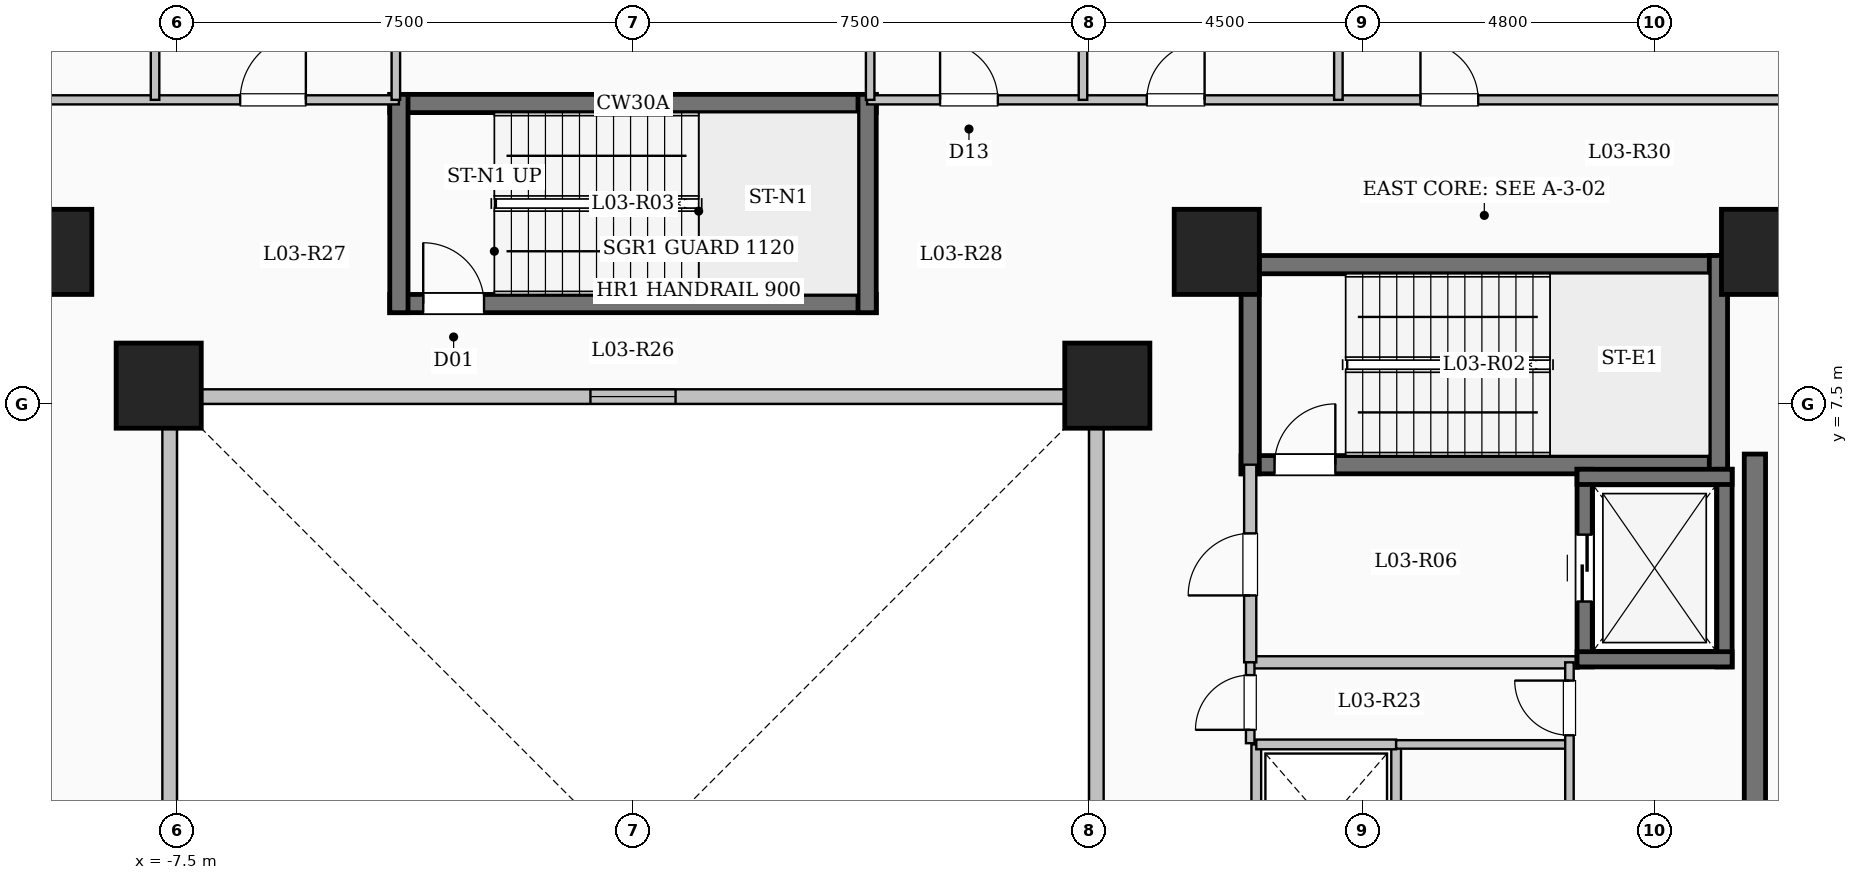
"""IFC4 building model, lengths in metres.
Left out: names, types, materials, properties, quantities, classifications, styles, units other than length and angle.
Written with IfcOpenShell. Run it as: python <this file> out.ifc"""

import sys

from ifc_helpers import new_model, si_unit, direction, frame, frame_2d, origin, origin_2d, place, context, subcontext, project, spatial, rectangle, extrude, element, fill, save


model = new_model("IFC4")
c1 = context("Model", 3, precision=1e-05, world=origin(), true_north=direction((0.0, 1.0)))
c2 = subcontext(c1, "Body", "Model", "MODEL_VIEW")
j1 = project(units=[si_unit("LENGTHUNIT", "METRE"), si_unit("PLANEANGLEUNIT", "RADIAN")], contexts=[c1])
p1 = place(None, origin())
s1 = spatial("IfcSite", under=j1, at=p1, CompositionType="ELEMENT")
p2 = place(p1, origin())
s2 = spatial("IfcBuilding", under=s1, at=p2, CompositionType="ELEMENT")
p3 = place(p2, frame((0.0, 0.0, 14.4)))
s3 = spatial("IfcBuildingStorey", under=s2, at=p3, CompositionType="ELEMENT", Elevation=14.4)
for number, where, z_axis, x_axis in (
    (1, (-7.8, 7.8, 0.0), (0.0, 0.0, 1.0), (1.0, 0.0, 0.0)),
    (2, (7.8, 7.8, 0.0), (0.0, 0.0, 1.0), (1.0, 0.0, 0.0)),
    (3, (-9.6, 10.0, 0.0), (0.0, 0.0, 1.0), (1.0, 0.0, 0.0)),
    (4, (9.6, 10.0, 0.0), (0.0, 0.0, 1.0), (1.0, 0.0, 0.0)),
    (5, (18.6, 10.0, 0.0), (0.0, 0.0, 1.0), (1.0, 0.0, 0.0)),
):
    element("IfcColumn", number, at=place(p3, frame(where, z_axis=z_axis, x_axis=x_axis)), inside=s3, PredefinedType="COLUMN", context=c2, shape_type="SweptSolid", body=[
        extrude(rectangle(XDim=1.4, YDim=1.4, at=origin_2d()), origin(), (0.0, 0.0, 1.0), 4.5),
    ])
p4 = place(p3, frame((7.62, -7.62, 0.0), z_axis=(0.0, 0.0, 1.0), x_axis=(0.0, 1.0, 0.0)))
e6 = element("IfcWall", 6, at=p4, inside=s3, PredefinedType="SOLIDWALL", context=c2, shape_type="SweptSolid", body=[
    extrude(rectangle(XDim=15.24, YDim=0.24, at=frame_2d((7.62, 0.0))), origin(), (0.0, 0.0, 1.0), 4.2),
])
p5 = place(p4, frame((6.92, 0.0, 0.95)))
e7 = element("IfcOpeningElement", 7, at=p5, cuts=e6, PredefinedType="OPENING", context=c2, shape_type="SweptSolid", body=[
    extrude(rectangle(XDim=1.4, YDim=1.5, at=frame_2d((0.7, 0.75))), frame((0.0, 0.13, 0.0), z_axis=(0.0, -1.0, 0.0), x_axis=(1.0, 0.0, 0.0)), (0.0, 0.0, 1.0), 0.26),
])
p6 = place(p3, frame((7.62, 7.62, 0.0), z_axis=(0.0, 0.0, 1.0), x_axis=(-1.0, 0.0, 0.0)))
e8 = element("IfcWall", 8, at=p6, inside=s3, PredefinedType="SOLIDWALL", context=c2, shape_type="SweptSolid", body=[
    extrude(rectangle(XDim=15.24, YDim=0.24, at=frame_2d((7.62, 0.0))), origin(), (0.0, 0.0, 1.0), 4.2),
])
p7 = place(p6, frame((6.92, 0.0, 0.95)))
e9 = element("IfcOpeningElement", 9, at=p7, cuts=e8, PredefinedType="OPENING", context=c2, shape_type="SweptSolid", body=[
    extrude(rectangle(XDim=1.4, YDim=1.5, at=frame_2d((0.7, 0.75))), frame((0.0, 0.13, 0.0), z_axis=(0.0, -1.0, 0.0), x_axis=(1.0, 0.0, 0.0)), (0.0, 0.0, 1.0), 0.26),
])
p8 = place(p3, frame((-7.62, 7.62, 0.0), z_axis=(0.0, 0.0, 1.0), x_axis=(0.0, -1.0, 0.0)))
e10 = element("IfcWall", 10, at=p8, inside=s3, PredefinedType="SOLIDWALL", context=c2, shape_type="SweptSolid", body=[
    extrude(rectangle(XDim=15.24, YDim=0.24, at=frame_2d((7.62, 0.0))), origin(), (0.0, 0.0, 1.0), 4.2),
])
p9 = place(p8, frame((6.92, 0.0, 0.95)))
e11 = element("IfcOpeningElement", 11, at=p9, cuts=e10, PredefinedType="OPENING", context=c2, shape_type="SweptSolid", body=[
    extrude(rectangle(XDim=1.4, YDim=1.5, at=frame_2d((0.7, 0.75))), frame((0.0, 0.13, 0.0), z_axis=(0.0, -1.0, 0.0), x_axis=(1.0, 0.0, 0.0)), (0.0, 0.0, 1.0), 0.26),
])
p10 = place(p3, frame((10.0, 9.79, 0.0), z_axis=(0.0, 0.0, 1.0), x_axis=(1.0, 0.0, 0.0)))
e12 = element("IfcWall", 12, at=p10, inside=s3, PredefinedType="SHEAR", context=c2, shape_type="SweptSolid", body=[
    extrude(rectangle(XDim=8.0, YDim=0.3, at=frame_2d((4.0, 0.0))), origin(), (0.0, 0.0, 1.0), 4.5),
])
p11 = place(p3, frame((10.0, 6.5, 0.0), z_axis=(0.0, 0.0, 1.0), x_axis=(1.0, 0.0, 0.0)))
e13 = element("IfcWall", 13, at=p11, inside=s3, PredefinedType="SHEAR", context=c2, shape_type="SweptSolid", body=[
    extrude(rectangle(XDim=8.0, YDim=0.3, at=frame_2d((4.0, 0.0))), origin(), (0.0, 0.0, 1.0), 4.5),
])
p12 = place(p11, frame((0.55, 0.0, 0.0)))
e14 = element("IfcOpeningElement", 14, at=p12, cuts=e13, PredefinedType="OPENING", context=c2, shape_type="SweptSolid", body=[
    extrude(rectangle(XDim=1.0, YDim=2.15, at=frame_2d((0.5, 1.075))), frame((0.0, 0.16, 0.0), z_axis=(0.0, -1.0, 0.0), x_axis=(1.0, 0.0, 0.0)), (0.0, 0.0, 1.0), 0.32),
])
for number, where, z_axis, x_axis in (
    (15, (10.15, 6.35, 0.0), (0.0, 0.0, 1.0), (0.0, 1.0, 0.0)),
    (16, (17.85, 6.35, 0.0), (0.0, 0.0, 1.0), (0.0, 1.0, 0.0)),
):
    element("IfcWall", number, at=place(p3, frame(where, z_axis=z_axis, x_axis=x_axis)), inside=s3, PredefinedType="SHEAR", context=c2, shape_type="SweptSolid", body=[
        extrude(rectangle(XDim=3.59, YDim=0.3, at=frame_2d((1.795, 0.0))), origin(), (0.0, 0.0, 1.0), 4.5),
    ])
p13 = place(p3, frame((-4.0, 12.44, 0.0), z_axis=(0.0, 0.0, 1.0), x_axis=(1.0, 0.0, 0.0)))
e17 = element("IfcWall", 17, at=p13, inside=s3, PredefinedType="SHEAR", context=c2, shape_type="SweptSolid", body=[
    extrude(rectangle(XDim=8.0, YDim=0.3, at=frame_2d((4.0, 0.0))), origin(), (0.0, 0.0, 1.0), 4.5),
])
p14 = place(p3, frame((-4.0, 9.15, 0.0), z_axis=(0.0, 0.0, 1.0), x_axis=(1.0, 0.0, 0.0)))
e18 = element("IfcWall", 18, at=p14, inside=s3, PredefinedType="SHEAR", context=c2, shape_type="SweptSolid", body=[
    extrude(rectangle(XDim=8.0, YDim=0.3, at=frame_2d((4.0, 0.0))), origin(), (0.0, 0.0, 1.0), 4.5),
])
p15 = place(p14, frame((0.55, 0.0, 0.0)))
e19 = element("IfcOpeningElement", 19, at=p15, cuts=e18, PredefinedType="OPENING", context=c2, shape_type="SweptSolid", body=[
    extrude(rectangle(XDim=1.0, YDim=2.15, at=frame_2d((0.5, 1.075))), frame((0.0, 0.16, 0.0), z_axis=(0.0, -1.0, 0.0), x_axis=(1.0, 0.0, 0.0)), (0.0, 0.0, 1.0), 0.32),
])
for number, where, z_axis, x_axis in (
    (20, (-3.85, 9.0, 0.0), (0.0, 0.0, 1.0), (0.0, 1.0, 0.0)),
    (21, (3.85, 9.0, 0.0), (0.0, 0.0, 1.0), (0.0, 1.0, 0.0)),
):
    element("IfcWall", number, at=place(p3, frame(where, z_axis=z_axis, x_axis=x_axis)), inside=s3, PredefinedType="SHEAR", context=c2, shape_type="SweptSolid", body=[
        extrude(rectangle(XDim=3.59, YDim=0.3, at=frame_2d((1.795, 0.0))), origin(), (0.0, 0.0, 1.0), 4.5),
    ])
p16 = place(p3, frame((10.15, 3.25, 0.0), z_axis=(0.0, 0.0, 1.0), x_axis=(1.0, 0.0, 0.0)))
e22 = element("IfcWall", 22, at=p16, inside=s3, PredefinedType="SOLIDWALL", context=c2, shape_type="SweptSolid", body=[
    extrude(rectangle(XDim=5.4, YDim=0.2, at=frame_2d((2.7, 0.0))), origin(), (0.0, 0.0, 1.0), 4.2),
])
p17 = place(p3, frame((10.15, 3.25, 0.0), z_axis=(0.0, 0.0, 1.0), x_axis=(0.0, 1.0, 0.0)))
e23 = element("IfcWall", 23, at=p17, inside=s3, PredefinedType="SOLIDWALL", context=c2, shape_type="SweptSolid", body=[
    extrude(rectangle(XDim=3.25, YDim=0.2, at=frame_2d((1.625, 0.0))), origin(), (0.0, 0.0, 1.0), 4.2),
])
p18 = place(p17, frame((1.1, 0.0, 0.0)))
e24 = element("IfcOpeningElement", 24, at=p18, cuts=e23, PredefinedType="OPENING", context=c2, shape_type="SweptSolid", body=[
    extrude(rectangle(XDim=1.02, YDim=2.15, at=frame_2d((0.51, 1.075))), frame((0.0, 0.11, 0.0), z_axis=(0.0, -1.0, 0.0), x_axis=(1.0, 0.0, 0.0)), (0.0, 0.0, 1.0), 0.22),
])
p19 = place(p3, frame((15.65, 3.175, 0.0), z_axis=(0.0, 0.0, 1.0), x_axis=(0.0, 1.0, 0.0)))
e25 = element("IfcWall", 25, at=p19, inside=s3, PredefinedType="SHEAR", context=c2, shape_type="SweptSolid", body=[
    extrude(rectangle(XDim=3.25, YDim=0.25, at=frame_2d((1.625, 0.0))), origin(), (0.0, 0.0, 1.0), 4.5),
])
p20 = place(p19, frame((1.075, 0.0, 0.0)))
e26 = element("IfcOpeningElement", 26, at=p20, cuts=e25, PredefinedType="OPENING", context=c2, shape_type="SweptSolid", body=[
    extrude(rectangle(XDim=1.1, YDim=2.15, at=frame_2d((0.55, 1.075))), frame((0.0, 0.135, 0.0), z_axis=(0.0, -1.0, 0.0), x_axis=(1.0, 0.0, 0.0)), (0.0, 0.0, 1.0), 0.27),
])
p21 = place(p3, frame((17.95, 3.175, 0.0), z_axis=(0.0, 0.0, 1.0), x_axis=(0.0, 1.0, 0.0)))
e27 = element("IfcWall", 27, at=p21, inside=s3, PredefinedType="SHEAR", context=c2, shape_type="SweptSolid", body=[
    extrude(rectangle(XDim=3.25, YDim=0.25, at=frame_2d((1.625, 0.0))), origin(), (0.0, 0.0, 1.0), 4.5),
])
for number, where, z_axis, x_axis in (
    (28, (15.525, 3.3, 0.0), (0.0, 0.0, 1.0), (1.0, 0.0, 0.0)),
    (29, (15.525, 6.3, 0.0), (0.0, 0.0, 1.0), (1.0, 0.0, 0.0)),
):
    element("IfcWall", number, at=place(p3, frame(where, z_axis=z_axis, x_axis=x_axis)), inside=s3, PredefinedType="SHEAR", context=c2, shape_type="SweptSolid", body=[
        extrude(rectangle(XDim=2.55, YDim=0.25, at=frame_2d((1.275, 0.0))), origin(), (0.0, 0.0, 1.0), 4.5),
    ])
for number, where, z_axis, x_axis in (
    (30, (10.25, -0.7, 0.0), (0.0, 0.0, 1.0), (0.0, 1.0, 0.0)),
    (31, (12.55, -0.7, 0.0), (0.0, 0.0, 1.0), (0.0, 1.0, 0.0)),
):
    element("IfcWall", number, at=place(p3, frame(where, z_axis=z_axis, x_axis=x_axis)), inside=s3, PredefinedType="SOLIDWALL", context=c2, shape_type="SweptSolid", body=[
        extrude(rectangle(XDim=2.6, YDim=0.16, at=frame_2d((1.3, 0.0))), origin(), (0.0, 0.0, 1.0), 4.2),
    ])
p22 = place(p3, frame((10.25, 1.9, 0.0), z_axis=(0.0, 0.0, 1.0), x_axis=(1.0, 0.0, 0.0)))
e32 = element("IfcWall", 32, at=p22, inside=s3, PredefinedType="SOLIDWALL", context=c2, shape_type="SweptSolid", body=[
    extrude(rectangle(XDim=2.3, YDim=0.16, at=frame_2d((1.15, 0.0))), origin(), (0.0, 0.0, 1.0), 4.2),
])
p23 = place(p3, frame((18.45, -7.375, 0.0), z_axis=(0.0, 0.0, 1.0), x_axis=(0.0, 1.0, 0.0)))
e33 = element("IfcWall", 33, at=p23, inside=s3, PredefinedType="SHEAR", context=c2, shape_type="SweptSolid", body=[
    extrude(rectangle(XDim=14.05, YDim=0.35, at=frame_2d((7.025, 0.0))), origin(), (0.0, 0.0, 1.0), 4.5),
])
p24 = place(p3, frame((12.55, 1.9, 0.0), z_axis=(0.0, 0.0, 1.0), x_axis=(1.0, 0.0, 0.0)))
e34 = element("IfcWall", 34, at=p24, inside=s3, PredefinedType="PARTITIONING", context=c2, shape_type="SweptSolid", body=[
    extrude(rectangle(XDim=2.85, YDim=0.14, at=frame_2d((1.425, 0.0))), origin(), (0.0, 0.0, 1.0), 4.2),
])
p25 = place(p3, frame((10.15, 1.92, 0.0), z_axis=(0.0, 0.0, 1.0), x_axis=(0.0, 1.0, 0.0)))
e35 = element("IfcWall", 35, at=p25, inside=s3, PredefinedType="PARTITIONING", context=c2, shape_type="SweptSolid", body=[
    extrude(rectangle(XDim=1.33, YDim=0.14, at=frame_2d((0.665, 0.0))), origin(), (0.0, 0.0, 1.0), 4.2),
])
p26 = place(p25, frame((0.22, 0.0, 0.0)))
e36 = element("IfcOpeningElement", 36, at=p26, cuts=e35, PredefinedType="OPENING", context=c2, shape_type="SweptSolid", body=[
    extrude(rectangle(XDim=0.9, YDim=2.08, at=frame_2d((0.45, 1.04))), frame((0.0, 0.08, 0.0), z_axis=(0.0, -1.0, 0.0), x_axis=(1.0, 0.0, 0.0)), (0.0, 0.0, 1.0), 0.16),
])
p27 = place(p3, frame((15.4, -7.2, 0.0), z_axis=(0.0, 0.0, 1.0), x_axis=(0.0, 1.0, 0.0)))
e37 = element("IfcWall", 37, at=p27, inside=s3, PredefinedType="PARTITIONING", context=c2, shape_type="SweptSolid", body=[
    extrude(rectangle(XDim=10.45, YDim=0.14, at=frame_2d((5.225, 0.0))), origin(), (0.0, 0.0, 1.0), 4.2),
])
p28 = place(p27, frame((9.25, 0.0, 0.0)))
e38 = element("IfcOpeningElement", 38, at=p28, cuts=e37, PredefinedType="OPENING", context=c2, shape_type="SweptSolid", body=[
    extrude(rectangle(XDim=0.9, YDim=2.08, at=frame_2d((0.45, 1.04))), frame((0.0, 0.08, 0.0), z_axis=(0.0, -1.0, 0.0), x_axis=(1.0, 0.0, 0.0)), (0.0, 0.0, 1.0), 0.16),
])
p29 = place(p3, frame((-28.88, 12.5, 0.0), z_axis=(0.0, 0.0, 1.0), x_axis=(1.0, 0.0, 0.0)))
e39 = element("IfcWall", 39, at=p29, inside=s3, PredefinedType="PARTITIONING", context=c2, shape_type="SweptSolid", body=[
    extrude(rectangle(XDim=25.03, YDim=0.15, at=frame_2d((12.515, 0.0))), origin(), (0.0, 0.0, 1.0), 4.2),
])
p30 = place(p29, frame((2.5, 0.0, 0.0)))
e40 = element("IfcOpeningElement", 40, at=p30, cuts=e39, PredefinedType="OPENING", context=c2, shape_type="SweptSolid", body=[
    extrude(rectangle(XDim=1.2, YDim=2.15, at=frame_2d((0.6, 1.075))), frame((0.0, 0.085, 0.0), z_axis=(0.0, -1.0, 0.0), x_axis=(1.0, 0.0, 0.0)), (0.0, 0.0, 1.0), 0.17),
])
p31 = place(p29, frame((18.03, 0.0, 0.0)))
e41 = element("IfcOpeningElement", 41, at=p31, cuts=e39, PredefinedType="OPENING", context=c2, shape_type="SweptSolid", body=[
    extrude(rectangle(XDim=1.08, YDim=2.15, at=frame_2d((0.54, 1.075))), frame((0.0, 0.085, 0.0), z_axis=(0.0, -1.0, 0.0), x_axis=(1.0, 0.0, 0.0)), (0.0, 0.0, 1.0), 0.17),
])
p32 = place(p29, frame((22.42, 0.0, 0.0)))
e42 = element("IfcOpeningElement", 42, at=p32, cuts=e39, PredefinedType="OPENING", context=c2, shape_type="SweptSolid", body=[
    extrude(rectangle(XDim=1.08, YDim=2.15, at=frame_2d((0.54, 1.075))), frame((0.0, 0.085, 0.0), z_axis=(0.0, -1.0, 0.0), x_axis=(1.0, 0.0, 0.0)), (0.0, 0.0, 1.0), 0.17),
])
p33 = place(p3, frame((3.85, 12.5, 0.0), z_axis=(0.0, 0.0, 1.0), x_axis=(1.0, 0.0, 0.0)))
e43 = element("IfcWall", 43, at=p33, inside=s3, PredefinedType="PARTITIONING", context=c2, shape_type="SweptSolid", body=[
    extrude(rectangle(XDim=25.03, YDim=0.15, at=frame_2d((12.515, 0.0))), origin(), (0.0, 0.0, 1.0), 4.2),
])
p34 = place(p33, frame((1.2, 0.0, 0.0)))
e44 = element("IfcOpeningElement", 44, at=p34, cuts=e43, PredefinedType="OPENING", context=c2, shape_type="SweptSolid", body=[
    extrude(rectangle(XDim=0.95, YDim=2.15, at=frame_2d((0.475, 1.075))), frame((0.0, 0.085, 0.0), z_axis=(0.0, -1.0, 0.0), x_axis=(1.0, 0.0, 0.0)), (0.0, 0.0, 1.0), 0.17),
])
p35 = place(p33, frame((4.6, 0.0, 0.0)))
e45 = element("IfcOpeningElement", 45, at=p35, cuts=e43, PredefinedType="OPENING", context=c2, shape_type="SweptSolid", body=[
    extrude(rectangle(XDim=0.95, YDim=2.15, at=frame_2d((0.475, 1.075))), frame((0.0, 0.085, 0.0), z_axis=(0.0, -1.0, 0.0), x_axis=(1.0, 0.0, 0.0)), (0.0, 0.0, 1.0), 0.17),
])
p36 = place(p33, frame((9.1, 0.0, 0.0)))
e46 = element("IfcOpeningElement", 46, at=p36, cuts=e43, PredefinedType="OPENING", context=c2, shape_type="SweptSolid", body=[
    extrude(rectangle(XDim=0.95, YDim=2.15, at=frame_2d((0.475, 1.075))), frame((0.0, 0.085, 0.0), z_axis=(0.0, -1.0, 0.0), x_axis=(1.0, 0.0, 0.0)), (0.0, 0.0, 1.0), 0.17),
])
p37 = place(p33, frame((17.3, 0.0, 0.0)))
e47 = element("IfcOpeningElement", 47, at=p37, cuts=e43, PredefinedType="OPENING", context=c2, shape_type="SweptSolid", body=[
    extrude(rectangle(XDim=1.08, YDim=2.15, at=frame_2d((0.54, 1.075))), frame((0.0, 0.085, 0.0), z_axis=(0.0, -1.0, 0.0), x_axis=(1.0, 0.0, 0.0)), (0.0, 0.0, 1.0), 0.17),
])
p38 = place(p33, frame((21.33, 0.0, 0.0)))
e48 = element("IfcOpeningElement", 48, at=p38, cuts=e43, PredefinedType="OPENING", context=c2, shape_type="SweptSolid", body=[
    extrude(rectangle(XDim=1.08, YDim=2.15, at=frame_2d((0.54, 1.075))), frame((0.0, 0.085, 0.0), z_axis=(0.0, -1.0, 0.0), x_axis=(1.0, 0.0, 0.0)), (0.0, 0.0, 1.0), 0.17),
])
for number, where, z_axis, x_axis in (
    (49, (-3.9, 12.5, 0.0), (0.0, 0.0, 1.0), (0.0, 1.0, 0.0)),
    (50, (3.9, 12.5, 0.0), (0.0, 0.0, 1.0), (0.0, 1.0, 0.0)),
    (51, (-7.86, 12.5, 0.0), (0.0, 0.0, 1.0), (0.0, 1.0, 0.0)),
    (52, (7.4, 12.5, 0.0), (0.0, 0.0, 1.0), (0.0, 1.0, 0.0)),
    (53, (11.6, 12.5, 0.0), (0.0, 0.0, 1.0), (0.0, 1.0, 0.0)),
):
    element("IfcWall", number, at=place(p3, frame(where, z_axis=z_axis, x_axis=x_axis)), inside=s3, PredefinedType="PARTITIONING", context=c2, shape_type="SweptSolid", body=[
        extrude(rectangle(XDim=17.38, YDim=0.14, at=frame_2d((8.69, 0.0))), origin(), (0.0, 0.0, 1.0), 4.2),
    ])
p39 = place(p7, origin())
e54 = element("IfcWindow", 54, at=p39, inside=s3, PartitioningType="SINGLE_PANEL", PredefinedType="WINDOW", context=c2, shape_type="SweptSolid", body=[
    extrude(rectangle(XDim=1.4, YDim=1.5, at=frame_2d((0.7, 0.75))), frame((0.0, 0.03, 0.0), z_axis=(0.0, -1.0, 0.0), x_axis=(1.0, 0.0, 0.0)), (0.0, 0.0, 1.0), 0.06),
])
fill(e9, e54)
p40 = place(p12, origin())
e55 = element("IfcDoor", 55, at=p40, inside=s3, OperationType="SINGLE_SWING_RIGHT", PredefinedType="DOOR", context=c2, shape_type="SweptSolid", body=[
    extrude(rectangle(XDim=1.0, YDim=2.15, at=frame_2d((0.5, 1.075))), frame((0.0, 0.025, 0.0), z_axis=(0.0, -1.0, 0.0), x_axis=(1.0, 0.0, 0.0)), (0.0, 0.0, 1.0), 0.05),
])
fill(e14, e55)
p41 = place(p15, origin())
e56 = element("IfcDoor", 56, at=p41, inside=s3, OperationType="SINGLE_SWING_LEFT", PredefinedType="DOOR", context=c2, shape_type="SweptSolid", body=[
    extrude(rectangle(XDim=1.0, YDim=2.15, at=frame_2d((0.5, 1.075))), frame((0.0, 0.025, 0.0), z_axis=(0.0, -1.0, 0.0), x_axis=(1.0, 0.0, 0.0)), (0.0, 0.0, 1.0), 0.05),
])
fill(e19, e56)
p42 = place(p18, origin())
e57 = element("IfcDoor", 57, at=p42, inside=s3, OperationType="SINGLE_SWING_LEFT", PredefinedType="DOOR", context=c2, shape_type="SweptSolid", body=[
    extrude(rectangle(XDim=1.02, YDim=2.15, at=frame_2d((0.51, 1.075))), frame((0.0, 0.025, 0.0), z_axis=(0.0, -1.0, 0.0), x_axis=(1.0, 0.0, 0.0)), (0.0, 0.0, 1.0), 0.05),
])
fill(e24, e57)
p43 = place(p20, origin())
e58 = element("IfcDoor", 58, at=p43, inside=s3, OperationType="SLIDING_TO_LEFT", PredefinedType="DOOR", context=c2, shape_type="SweptSolid", body=[
    extrude(rectangle(XDim=1.1, YDim=2.15, at=frame_2d((0.55, 1.075))), frame((0.0, 0.025, 0.0), z_axis=(0.0, -1.0, 0.0), x_axis=(1.0, 0.0, 0.0)), (0.0, 0.0, 1.0), 0.05),
])
fill(e26, e58)
p44 = place(p26, origin())
e59 = element("IfcDoor", 59, at=p44, inside=s3, OperationType="SINGLE_SWING_LEFT", PredefinedType="DOOR", context=c2, shape_type="SweptSolid", body=[
    extrude(rectangle(XDim=0.9, YDim=2.08, at=frame_2d((0.45, 1.04))), frame((0.0, 0.025, 0.0), z_axis=(0.0, -1.0, 0.0), x_axis=(1.0, 0.0, 0.0)), (0.0, 0.0, 1.0), 0.05),
])
fill(e36, e59)
p45 = place(p28, origin())
e60 = element("IfcDoor", 60, at=p45, inside=s3, OperationType="SINGLE_SWING_RIGHT", PredefinedType="DOOR", context=c2, shape_type="SweptSolid", body=[
    extrude(rectangle(XDim=0.9, YDim=2.08, at=frame_2d((0.45, 1.04))), frame((0.0, 0.025, 0.0), z_axis=(0.0, -1.0, 0.0), x_axis=(1.0, 0.0, 0.0)), (0.0, 0.0, 1.0), 0.05),
])
fill(e38, e60)
p46 = place(p32, origin())
e61 = element("IfcDoor", 61, at=p46, inside=s3, OperationType="SINGLE_SWING_RIGHT", PredefinedType="DOOR", context=c2, shape_type="SweptSolid", body=[
    extrude(rectangle(XDim=1.08, YDim=2.15, at=frame_2d((0.54, 1.075))), frame((0.0, 0.025, 0.0), z_axis=(0.0, -1.0, 0.0), x_axis=(1.0, 0.0, 0.0)), (0.0, 0.0, 1.0), 0.05),
])
fill(e42, e61)
p47 = place(p34, origin())
e62 = element("IfcDoor", 62, at=p47, inside=s3, OperationType="SINGLE_SWING_LEFT", PredefinedType="DOOR", context=c2, shape_type="SweptSolid", body=[
    extrude(rectangle(XDim=0.95, YDim=2.15, at=frame_2d((0.475, 1.075))), frame((0.0, 0.025, 0.0), z_axis=(0.0, -1.0, 0.0), x_axis=(1.0, 0.0, 0.0)), (0.0, 0.0, 1.0), 0.05),
])
fill(e44, e62)
p48 = place(p35, origin())
e63 = element("IfcDoor", 63, at=p48, inside=s3, OperationType="SINGLE_SWING_RIGHT", PredefinedType="DOOR", context=c2, shape_type="SweptSolid", body=[
    extrude(rectangle(XDim=0.95, YDim=2.15, at=frame_2d((0.475, 1.075))), frame((0.0, 0.025, 0.0), z_axis=(0.0, -1.0, 0.0), x_axis=(1.0, 0.0, 0.0)), (0.0, 0.0, 1.0), 0.05),
])
fill(e45, e63)
p49 = place(p36, origin())
e64 = element("IfcDoor", 64, at=p49, inside=s3, OperationType="SINGLE_SWING_LEFT", PredefinedType="DOOR", context=c2, shape_type="SweptSolid", body=[
    extrude(rectangle(XDim=0.95, YDim=2.15, at=frame_2d((0.475, 1.075))), frame((0.0, 0.025, 0.0), z_axis=(0.0, -1.0, 0.0), x_axis=(1.0, 0.0, 0.0)), (0.0, 0.0, 1.0), 0.05),
])
fill(e46, e64)
save(model, sys.argv[1])
